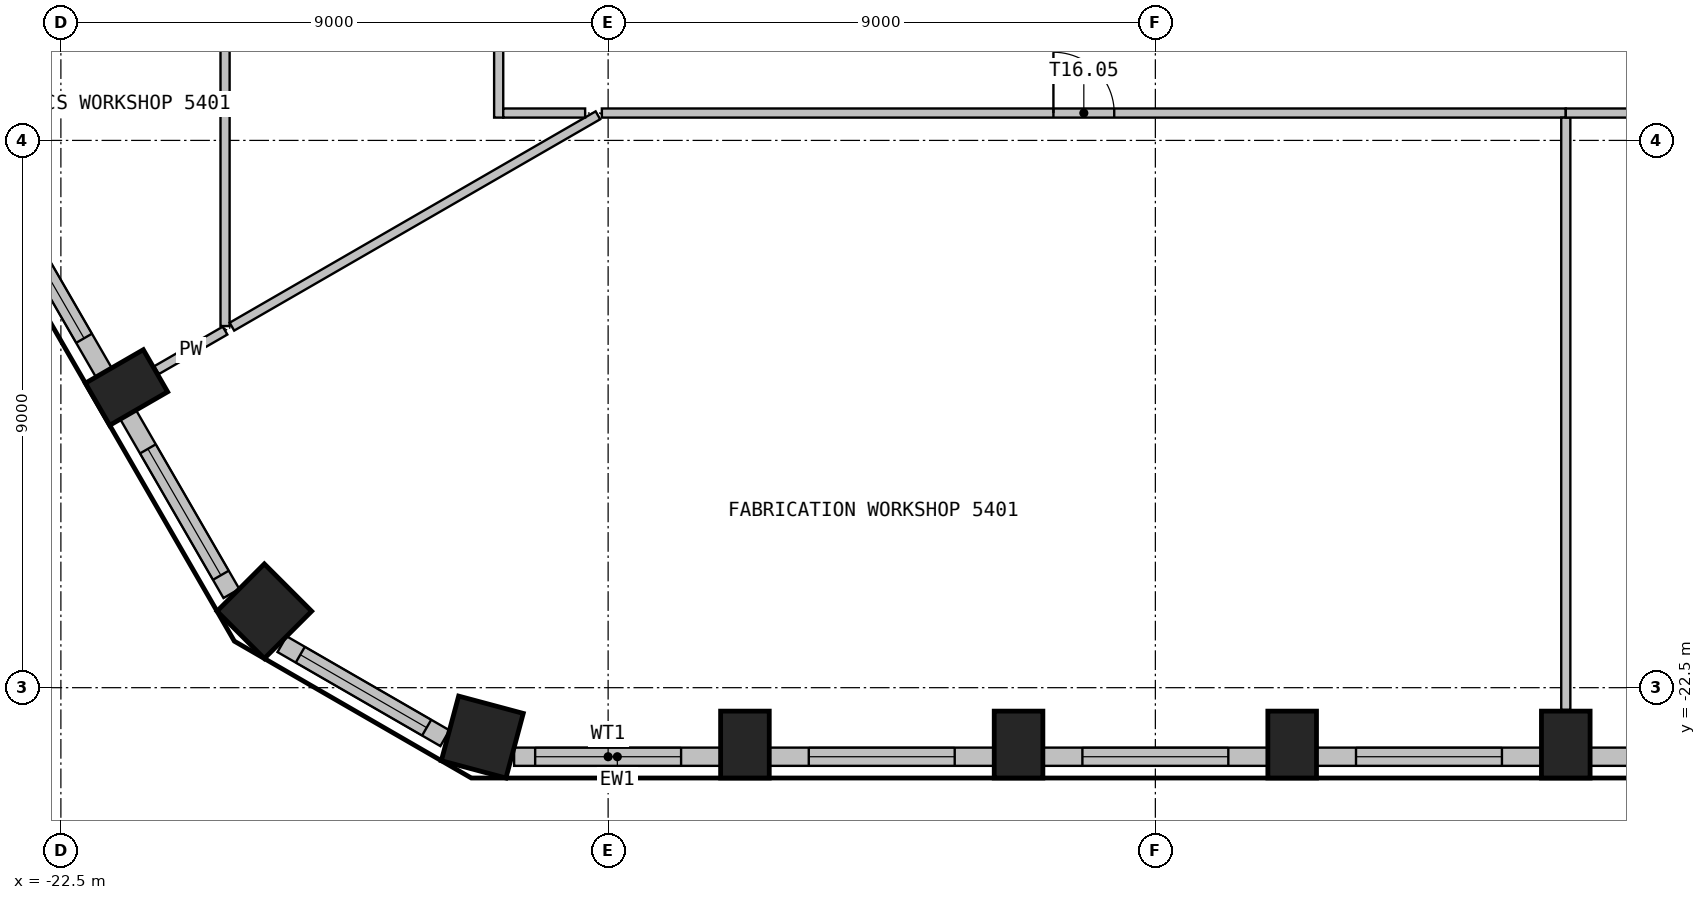
"""IFC4 building model, lengths in metres.
Left out: names, types, materials, properties, quantities, classifications, styles, units other than length and angle.
Written with IfcOpenShell. Run it as: python <this file> out.ifc"""

import sys

from ifc_helpers import new_model, si_unit, direction, frame, frame_2d, origin, origin_2d, place, context, subcontext, project, spatial, rectangle, extrude, element, fill, save


model = new_model("IFC4")
c1 = context("Model", 3, precision=1e-05, world=origin(), true_north=direction((0.0, 1.0)))
c2 = subcontext(c1, "Body", "Model", "MODEL_VIEW")
j1 = project(units=[si_unit("LENGTHUNIT", "METRE"), si_unit("PLANEANGLEUNIT", "RADIAN")], contexts=[c1])
p1 = place(None, origin())
s1 = spatial("IfcSite", under=j1, at=p1, CompositionType="ELEMENT")
p2 = place(p1, origin())
s2 = spatial("IfcBuilding", under=s1, at=p2, CompositionType="ELEMENT")
p3 = place(p2, frame((0.0, 0.0, 219.0)))
s3 = spatial("IfcBuildingStorey", under=s2, at=p3, CompositionType="ELEMENT", Elevation=219.0)
p4 = place(p3, frame((-15.57, -23.312, 0.0), z_axis=(0.0, 0.0, 1.0), x_axis=(0.965925826289, -0.258819045103, 0.0)))
e1 = element("IfcColumn", 1, at=p4, inside=s3, PredefinedType="COLUMN", context=c2, shape_type="SweptSolid", body=[
    extrude(rectangle(XDim=1.1, YDim=1.1, at=origin_2d()), origin(), (0.0, 0.0, 1.0), 3.55),
])
for number, where, z_axis, x_axis in (
    (2, (-11.25, -23.436, 0.0), (0.0, 0.0, 1.0), (1.0, 0.0, 0.0)),
    (3, (-6.75, -23.436, 0.0), (0.0, 0.0, 1.0), (1.0, 0.0, 0.0)),
    (4, (-2.25, -23.436, 0.0), (0.0, 0.0, 1.0), (1.0, 0.0, 0.0)),
    (5, (2.25, -23.436, 0.0), (0.0, 0.0, 1.0), (1.0, 0.0, 0.0)),
    (6, (-21.421, -17.563, 0.0), (0.0, 0.0, 1.0), (0.5, -0.866, 0.0)),
):
    element("IfcColumn", number, at=place(p3, frame(where, z_axis=z_axis, x_axis=x_axis)), inside=s3, PredefinedType="COLUMN", context=c2, shape_type="SweptSolid", body=[
        extrude(rectangle(XDim=0.8, YDim=1.1, at=origin_2d()), origin(), (0.0, 0.0, 1.0), 3.55),
    ])
p5 = place(p3, frame((-19.154, -21.242, 0.0), z_axis=(0.0, 0.0, 1.0), x_axis=(0.707106781187, -0.707106781187, 0.0)))
e7 = element("IfcColumn", 7, at=p5, inside=s3, PredefinedType="COLUMN", context=c2, shape_type="SweptSolid", body=[
    extrude(rectangle(XDim=1.1, YDim=1.1, at=origin_2d()), origin(), (0.0, 0.0, 1.0), 3.55),
])
p6 = place(p3, frame((-15.046, -23.635, 0.0), z_axis=(0.0, 0.0, 1.0), x_axis=(1.0, 0.0, 0.0)))
e8 = element("IfcWall", 8, at=p6, inside=s3, PredefinedType="SOLIDWALL", context=c2, shape_type="SweptSolid", body=[
    extrude(rectangle(XDim=3.396, YDim=0.3, at=frame_2d((1.698, 0.0))), origin(), (0.0, 0.0, 1.0), 3.55),
])
p7 = place(p6, frame((0.346, 0.0, 0.9)))
e9 = element("IfcOpeningElement", 9, at=p7, cuts=e8, PredefinedType="OPENING", context=c2, shape_type="SweptSolid", body=[
    extrude(rectangle(XDim=2.4, YDim=2.1, at=frame_2d((1.2, 1.05))), frame((0.0, 0.16, 0.0), z_axis=(0.0, -1.0, 0.0), x_axis=(1.0, 0.0, 0.0)), (0.0, 0.0, 1.0), 0.32),
])
p8 = place(p3, frame((-10.85, -23.635, 0.0), z_axis=(0.0, 0.0, 1.0), x_axis=(1.0, 0.0, 0.0)))
e10 = element("IfcWall", 10, at=p8, inside=s3, PredefinedType="SOLIDWALL", context=c2, shape_type="SweptSolid", body=[
    extrude(rectangle(XDim=3.699, YDim=0.3, at=frame_2d((1.85, 0.0))), origin(), (0.0, 0.0, 1.0), 3.55),
])
p9 = place(p8, frame((0.649, 0.0, 0.9)))
e11 = element("IfcOpeningElement", 11, at=p9, cuts=e10, PredefinedType="OPENING", context=c2, shape_type="SweptSolid", body=[
    extrude(rectangle(XDim=2.4, YDim=2.1, at=frame_2d((1.2, 1.05))), frame((0.0, 0.16, 0.0), z_axis=(0.0, -1.0, 0.0), x_axis=(1.0, 0.0, 0.0)), (0.0, 0.0, 1.0), 0.32),
])
p10 = place(p3, frame((-6.35, -23.635, 0.0), z_axis=(0.0, 0.0, 1.0), x_axis=(1.0, 0.0, 0.0)))
e12 = element("IfcWall", 12, at=p10, inside=s3, PredefinedType="SOLIDWALL", context=c2, shape_type="SweptSolid", body=[
    extrude(rectangle(XDim=3.699, YDim=0.3, at=frame_2d((1.85, 0.0))), origin(), (0.0, 0.0, 1.0), 3.55),
])
p11 = place(p10, frame((0.649, 0.0, 0.9)))
e13 = element("IfcOpeningElement", 13, at=p11, cuts=e12, PredefinedType="OPENING", context=c2, shape_type="SweptSolid", body=[
    extrude(rectangle(XDim=2.4, YDim=2.1, at=frame_2d((1.2, 1.05))), frame((0.0, 0.16, 0.0), z_axis=(0.0, -1.0, 0.0), x_axis=(1.0, 0.0, 0.0)), (0.0, 0.0, 1.0), 0.32),
])
p12 = place(p3, frame((-1.85, -23.635, 0.0), z_axis=(0.0, 0.0, 1.0), x_axis=(1.0, 0.0, 0.0)))
e14 = element("IfcWall", 14, at=p12, inside=s3, PredefinedType="SOLIDWALL", context=c2, shape_type="SweptSolid", body=[
    extrude(rectangle(XDim=3.699, YDim=0.3, at=frame_2d((1.85, 0.0))), origin(), (0.0, 0.0, 1.0), 3.55),
])
p13 = place(p12, frame((0.649, 0.0, 0.9)))
e15 = element("IfcOpeningElement", 15, at=p13, cuts=e14, PredefinedType="OPENING", context=c2, shape_type="SweptSolid", body=[
    extrude(rectangle(XDim=2.4, YDim=2.1, at=frame_2d((1.2, 1.05))), frame((0.0, 0.16, 0.0), z_axis=(0.0, -1.0, 0.0), x_axis=(1.0, 0.0, 0.0)), (0.0, 0.0, 1.0), 0.32),
])
p14 = place(p3, frame((2.65, -23.635, 0.0), z_axis=(0.0, 0.0, 1.0), x_axis=(1.0, 0.0, 0.0)))
e16 = element("IfcWall", 16, at=p14, inside=s3, PredefinedType="SOLIDWALL", context=c2, shape_type="SweptSolid", body=[
    extrude(rectangle(XDim=3.699, YDim=0.3, at=frame_2d((1.85, 0.0))), origin(), (0.0, 0.0, 1.0), 3.55),
])
p15 = place(p14, frame((0.649, 0.0, 0.9)))
e17 = element("IfcOpeningElement", 17, at=p15, cuts=e16, PredefinedType="OPENING", context=c2, shape_type="SweptSolid", body=[
    extrude(rectangle(XDim=2.4, YDim=2.1, at=frame_2d((1.2, 1.05))), frame((0.0, 0.16, 0.0), z_axis=(0.0, -1.0, 0.0), x_axis=(1.0, 0.0, 0.0)), (0.0, 0.0, 1.0), 0.32),
])
p16 = place(p3, frame((-23.644, -14.113, 0.0), z_axis=(0.0, 0.0, 1.0), x_axis=(0.500029062817, -0.866008623709, 0.0)))
e18 = element("IfcWall", 18, at=p16, inside=s3, PredefinedType="SOLIDWALL", context=c2, shape_type="SweptSolid", body=[
    extrude(rectangle(XDim=3.699, YDim=0.3, at=frame_2d((1.85, 0.0))), origin(), (0.0, 0.0, 1.0), 3.55),
])
p17 = place(p16, frame((0.649, 0.0, 0.9)))
e19 = element("IfcOpeningElement", 19, at=p17, cuts=e18, PredefinedType="OPENING", context=c2, shape_type="SweptSolid", body=[
    extrude(rectangle(XDim=2.4, YDim=2.1, at=frame_2d((1.2, 1.05))), frame((0.0, 0.16, 0.0), z_axis=(0.0, -1.0, 0.0), x_axis=(1.0, 0.0, 0.0)), (0.0, 0.0, 1.0), 0.32),
])
p18 = place(p3, frame((-21.394, -18.01, 0.0), z_axis=(0.0, 0.0, 1.0), x_axis=(0.500012868213, -0.866017974191, 0.0)))
e20 = element("IfcWall", 20, at=p18, inside=s3, PredefinedType="SOLIDWALL", context=c2, shape_type="SweptSolid", body=[
    extrude(rectangle(XDim=3.396, YDim=0.3, at=frame_2d((1.698, 0.0))), origin(), (0.0, 0.0, 1.0), 3.55),
])
p19 = place(p18, frame((0.649, 0.0, 0.9)))
e21 = element("IfcOpeningElement", 21, at=p19, cuts=e20, PredefinedType="OPENING", context=c2, shape_type="SweptSolid", body=[
    extrude(rectangle(XDim=2.4, YDim=2.1, at=frame_2d((1.2, 1.05))), frame((0.0, 0.16, 0.0), z_axis=(0.0, -1.0, 0.0), x_axis=(1.0, 0.0, 0.0)), (0.0, 0.0, 1.0), 0.32),
])
p20 = place(p3, frame((-18.863, -21.784, 0.0), z_axis=(0.0, 0.0, 1.0), x_axis=(0.865994975416, -0.500052699777, 0.0)))
e22 = element("IfcWall", 22, at=p20, inside=s3, PredefinedType="SOLIDWALL", context=c2, shape_type="SweptSolid", body=[
    extrude(rectangle(XDim=3.093, YDim=0.3, at=frame_2d((1.546, 0.0))), origin(), (0.0, 0.0, 1.0), 3.55),
])
p21 = place(p20, frame((0.346, 0.0, 0.9)))
e23 = element("IfcOpeningElement", 23, at=p21, cuts=e22, PredefinedType="OPENING", context=c2, shape_type="SweptSolid", body=[
    extrude(rectangle(XDim=2.4, YDim=2.1, at=frame_2d((1.2, 1.05))), frame((0.0, 0.16, 0.0), z_axis=(0.0, -1.0, 0.0), x_axis=(1.0, 0.0, 0.0)), (0.0, 0.0, 1.0), 0.32),
])
p22 = place(p3, frame((-19.8, -16.628, 0.0), z_axis=(0.0, 0.0, 1.0), x_axis=(-0.866157475642, -0.499771175029, 0.0)))
e24 = element("IfcWall", 24, at=p22, inside=s3, PredefinedType="PARTITIONING", context=c2, shape_type="SweptSolid", body=[
    extrude(rectangle(XDim=1.301, YDim=0.15, at=frame_2d((0.651, 0.0))), origin(), (0.0, 0.0, 1.0), 3.55),
])
p23 = place(p3, frame((-19.8, -2.325, 0.0), z_axis=(0.0, 0.0, 1.0), x_axis=(0.0, -1.0, 0.0)))
e25 = element("IfcWall", 25, at=p23, inside=s3, PredefinedType="PARTITIONING", context=c2, shape_type="SweptSolid", body=[
    extrude(rectangle(XDim=14.228, YDim=0.15, at=frame_2d((7.114, 0.0))), origin(), (0.0, 0.0, 1.0), 3.55),
])
p24 = place(p3, frame((-13.668, -13.087, 0.0), z_axis=(0.0, 0.0, 1.0), x_axis=(-0.866012448988, -0.500022437694, 0.0)))
e26 = element("IfcWall", 26, at=p24, inside=s3, PredefinedType="PARTITIONING", context=c2, shape_type="SweptSolid", body=[
    extrude(rectangle(XDim=6.951, YDim=0.15, at=frame_2d((3.476, 0.0))), origin(), (0.0, 0.0, 1.0), 3.55),
])
p25 = place(p3, frame((-15.3, -2.325, 0.0), z_axis=(0.0, 0.0, 1.0), x_axis=(0.0, -1.0, 0.0)))
e27 = element("IfcWall", 27, at=p25, inside=s3, PredefinedType="PARTITIONING", context=c2, shape_type="SweptSolid", body=[
    extrude(rectangle(XDim=10.8, YDim=0.15, at=frame_2d((5.4, 0.0))), origin(), (0.0, 0.0, 1.0), 3.55),
])
p26 = place(p25, frame((4.9, 0.0, 0.0)))
e28 = element("IfcOpeningElement", 28, at=p26, cuts=e27, PredefinedType="OPENING", context=c2, shape_type="SweptSolid", body=[
    extrude(rectangle(XDim=1.0, YDim=2.1, at=frame_2d((0.5, 1.05))), frame((0.0, 0.085, 0.0), z_axis=(0.0, -1.0, 0.0), x_axis=(1.0, 0.0, 0.0)), (0.0, 0.0, 1.0), 0.17),
])
p27 = place(p3, frame((-15.225, -13.05, 0.0), z_axis=(0.0, 0.0, 1.0), x_axis=(1.0, 0.0, 0.0)))
e29 = element("IfcWall", 29, at=p27, inside=s3, PredefinedType="PARTITIONING", context=c2, shape_type="SweptSolid", body=[
    extrude(rectangle(XDim=1.347, YDim=0.15, at=frame_2d((0.674, 0.0))), origin(), (0.0, 0.0, 1.0), 3.55),
])
p28 = place(p3, frame((-13.603, -13.05, 0.0), z_axis=(0.0, 0.0, 1.0), x_axis=(1.0, 0.0, 0.0)))
e30 = element("IfcWall", 30, at=p28, inside=s3, PredefinedType="PARTITIONING", context=c2, shape_type="SweptSolid", body=[
    extrude(rectangle(XDim=15.853, YDim=0.15, at=frame_2d((7.927, 0.0))), origin(), (0.0, 0.0, 1.0), 3.55),
])
p29 = place(p28, frame((7.427, 0.0, 0.0)))
e31 = element("IfcOpeningElement", 31, at=p29, cuts=e30, PredefinedType="OPENING", context=c2, shape_type="SweptSolid", body=[
    extrude(rectangle(XDim=1.0, YDim=2.1, at=frame_2d((0.5, 1.05))), frame((0.0, 0.085, 0.0), z_axis=(0.0, -1.0, 0.0), x_axis=(1.0, 0.0, 0.0)), (0.0, 0.0, 1.0), 0.17),
])
p30 = place(p3, frame((2.25, -13.125, 0.0), z_axis=(0.0, 0.0, 1.0), x_axis=(0.0, -1.0, 0.0)))
e32 = element("IfcWall", 32, at=p30, inside=s3, PredefinedType="PARTITIONING", context=c2, shape_type="SweptSolid", body=[
    extrude(rectangle(XDim=9.74, YDim=0.15, at=frame_2d((4.87, 0.0))), origin(), (0.0, 0.0, 1.0), 3.55),
])
p31 = place(p3, frame((2.25, -13.05, 0.0), z_axis=(0.0, 0.0, 1.0), x_axis=(1.0, 0.0, 0.0)))
e33 = element("IfcWall", 33, at=p31, inside=s3, PredefinedType="PARTITIONING", context=c2, shape_type="SweptSolid", body=[
    extrude(rectangle(XDim=8.712, YDim=0.15, at=frame_2d((4.356, 0.0))), origin(), (0.0, 0.0, 1.0), 3.55),
])
p32 = place(p31, frame((3.856, 0.0, 0.0)))
e34 = element("IfcOpeningElement", 34, at=p32, cuts=e33, PredefinedType="OPENING", context=c2, shape_type="SweptSolid", body=[
    extrude(rectangle(XDim=1.0, YDim=2.1, at=frame_2d((0.5, 1.05))), frame((0.0, 0.085, 0.0), z_axis=(0.0, -1.0, 0.0), x_axis=(1.0, 0.0, 0.0)), (0.0, 0.0, 1.0), 0.17),
])
p33 = place(p7, origin())
e35 = element("IfcWindow", 35, at=p33, inside=s3, PartitioningType="SINGLE_PANEL", PredefinedType="WINDOW", context=c2, shape_type="SweptSolid", body=[
    extrude(rectangle(XDim=2.4, YDim=2.1, at=frame_2d((1.2, 1.05))), frame((0.0, 0.03, 0.0), z_axis=(0.0, -1.0, 0.0), x_axis=(1.0, 0.0, 0.0)), (0.0, 0.0, 1.0), 0.06),
])
fill(e9, e35)
p34 = place(p9, origin())
e36 = element("IfcWindow", 36, at=p34, inside=s3, PartitioningType="SINGLE_PANEL", PredefinedType="WINDOW", context=c2, shape_type="SweptSolid", body=[
    extrude(rectangle(XDim=2.4, YDim=2.1, at=frame_2d((1.2, 1.05))), frame((0.0, 0.03, 0.0), z_axis=(0.0, -1.0, 0.0), x_axis=(1.0, 0.0, 0.0)), (0.0, 0.0, 1.0), 0.06),
])
fill(e11, e36)
p35 = place(p11, origin())
e37 = element("IfcWindow", 37, at=p35, inside=s3, PartitioningType="SINGLE_PANEL", PredefinedType="WINDOW", context=c2, shape_type="SweptSolid", body=[
    extrude(rectangle(XDim=2.4, YDim=2.1, at=frame_2d((1.2, 1.05))), frame((0.0, 0.03, 0.0), z_axis=(0.0, -1.0, 0.0), x_axis=(1.0, 0.0, 0.0)), (0.0, 0.0, 1.0), 0.06),
])
fill(e13, e37)
p36 = place(p13, origin())
e38 = element("IfcWindow", 38, at=p36, inside=s3, PartitioningType="SINGLE_PANEL", PredefinedType="WINDOW", context=c2, shape_type="SweptSolid", body=[
    extrude(rectangle(XDim=2.4, YDim=2.1, at=frame_2d((1.2, 1.05))), frame((0.0, 0.03, 0.0), z_axis=(0.0, -1.0, 0.0), x_axis=(1.0, 0.0, 0.0)), (0.0, 0.0, 1.0), 0.06),
])
fill(e15, e38)
p37 = place(p17, origin())
e39 = element("IfcWindow", 39, at=p37, inside=s3, PartitioningType="SINGLE_PANEL", PredefinedType="WINDOW", context=c2, shape_type="SweptSolid", body=[
    extrude(rectangle(XDim=2.4, YDim=2.1, at=frame_2d((1.2, 1.05))), frame((0.0, 0.03, 0.0), z_axis=(0.0, -1.0, 0.0), x_axis=(1.0, 0.0, 0.0)), (0.0, 0.0, 1.0), 0.06),
])
fill(e19, e39)
p38 = place(p19, origin())
e40 = element("IfcWindow", 40, at=p38, inside=s3, PartitioningType="SINGLE_PANEL", PredefinedType="WINDOW", context=c2, shape_type="SweptSolid", body=[
    extrude(rectangle(XDim=2.4, YDim=2.1, at=frame_2d((1.2, 1.05))), frame((0.0, 0.03, 0.0), z_axis=(0.0, -1.0, 0.0), x_axis=(1.0, 0.0, 0.0)), (0.0, 0.0, 1.0), 0.06),
])
fill(e21, e40)
p39 = place(p21, origin())
e41 = element("IfcWindow", 41, at=p39, inside=s3, PartitioningType="SINGLE_PANEL", PredefinedType="WINDOW", context=c2, shape_type="SweptSolid", body=[
    extrude(rectangle(XDim=2.4, YDim=2.1, at=frame_2d((1.2, 1.05))), frame((0.0, 0.03, 0.0), z_axis=(0.0, -1.0, 0.0), x_axis=(1.0, 0.0, 0.0)), (0.0, 0.0, 1.0), 0.06),
])
fill(e23, e41)
p40 = place(p29, origin())
e42 = element("IfcDoor", 42, at=p40, inside=s3, OperationType="SINGLE_SWING_RIGHT", PredefinedType="DOOR", context=c2, shape_type="SweptSolid", body=[
    extrude(rectangle(XDim=1.0, YDim=2.1, at=frame_2d((0.5, 1.05))), frame((0.0, 0.025, 0.0), z_axis=(0.0, -1.0, 0.0), x_axis=(1.0, 0.0, 0.0)), (0.0, 0.0, 1.0), 0.05),
])
fill(e31, e42)
save(model, sys.argv[1])
